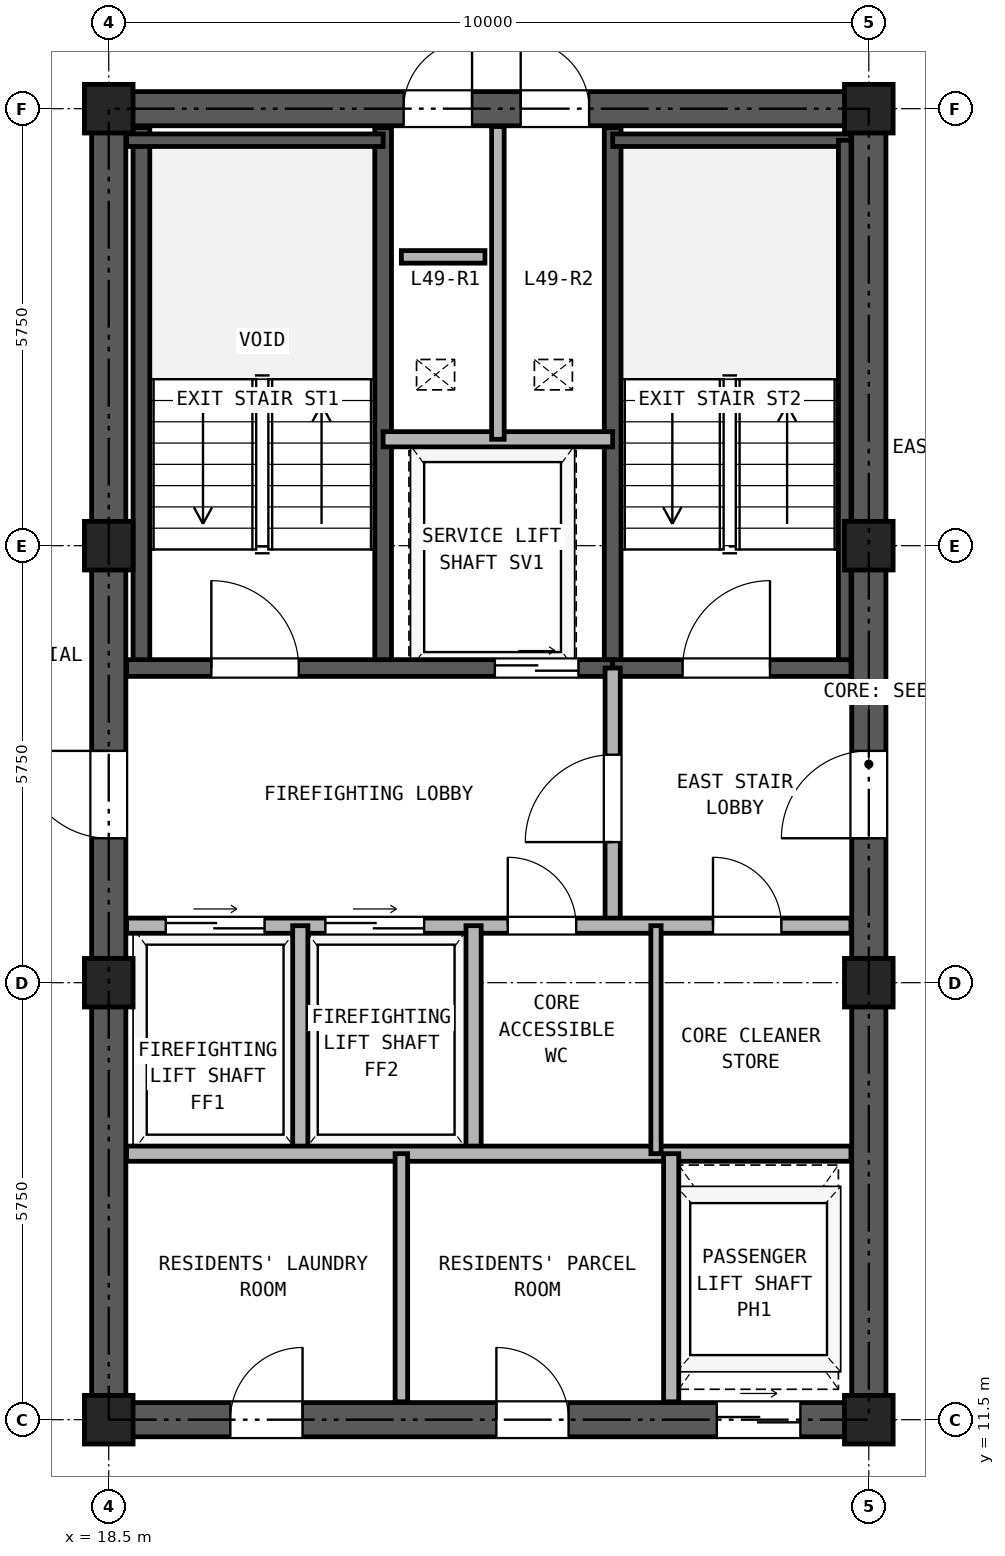
"""IFC4 building model, lengths in metres.
Left out: names, types, materials, properties, quantities, classifications, styles, units other than length and angle.
Written with IfcOpenShell. Run it as: python <this file> out.ifc"""

import sys

from ifc_helpers import new_model, si_unit, direction, frame, frame_2d, origin, origin_2d, place, context, subcontext, project, spatial, rectangle, hollow_rectangle, extrude, source, transform, mapped, element, fill, save


model = new_model("IFC4")
c1 = context("Model", 3, precision=1e-05, world=origin(), true_north=direction((0.0, 1.0)))
c2 = subcontext(c1, "Body", "Model", "MODEL_VIEW")
j1 = project(units=[si_unit("LENGTHUNIT", "METRE"), si_unit("PLANEANGLEUNIT", "RADIAN")], contexts=[c1])
p1 = place(None, origin())
s1 = spatial("IfcSite", under=j1, at=p1, CompositionType="ELEMENT")
p2 = place(p1, origin())
s2 = spatial("IfcBuilding", under=s1, at=p2, CompositionType="ELEMENT")
p3 = place(p2, frame((0.0, 0.0, 175.3)))
s3 = spatial("IfcBuildingStorey", under=s2, at=p3, CompositionType="ELEMENT", Elevation=175.3)
m1 = source(origin(), c2, "Body", "SweptSolid", [
    extrude(hollow_rectangle(XDim=0.64, YDim=0.64, WallThickness=0.035, at=origin_2d()), origin(), (0.0, 0.0, 1.0), 2.95),
])
for number, where, z_axis, x_axis in (
    (1, (18.5, 11.5, 0.0), (0.0, 0.0, 1.0), (1.0, 0.0, 0.0)),
    (2, (18.5, 17.25, 0.0), (0.0, 0.0, 1.0), (1.0, 0.0, 0.0)),
    (3, (18.5, 23.0, 0.0), (0.0, 0.0, 1.0), (1.0, 0.0, 0.0)),
    (4, (18.5, 28.75, 0.0), (0.0, 0.0, 1.0), (1.0, 0.0, 0.0)),
    (5, (28.5, 11.5, 0.0), (0.0, 0.0, 1.0), (1.0, 0.0, 0.0)),
    (6, (28.5, 17.25, 0.0), (0.0, 0.0, 1.0), (1.0, 0.0, 0.0)),
    (7, (28.5, 23.0, 0.0), (0.0, 0.0, 1.0), (1.0, 0.0, 0.0)),
    (8, (28.5, 28.75, 0.0), (0.0, 0.0, 1.0), (1.0, 0.0, 0.0)),
):
    element("IfcColumn", number, at=place(p3, frame(where, z_axis=z_axis, x_axis=x_axis)), inside=s3, PredefinedType="COLUMN", context=c2, shape_type="MappedRepresentation", body=[
        mapped(m1, transform((0.0, 0.0, 0.0), x_axis=(1.0, 0.0, 0.0), y_axis=(0.0, 1.0, 0.0), z_axis=(0.0, 0.0, 1.0), scale=1.0)),
    ])
p4 = place(p3, frame((18.275, 11.5, 0.0), z_axis=(0.0, 0.0, 1.0), x_axis=(1.0, 0.0, 0.0)))
e9 = element("IfcWall", 9, at=p4, inside=s3, PredefinedType="SHEAR", context=c2, shape_type="SweptSolid", body=[
    extrude(rectangle(XDim=10.45, YDim=0.45, at=frame_2d((5.225, 0.0))), origin(), (0.0, 0.0, 1.0), 2.95),
])
p5 = place(p4, frame((1.825, 0.0, 0.0)))
e10 = element("IfcOpeningElement", 10, at=p5, cuts=e9, PredefinedType="OPENING", context=c2, shape_type="SweptSolid", body=[
    extrude(rectangle(XDim=0.95, YDim=2.15, at=frame_2d((0.475, 1.075))), frame((0.0, 0.235, 0.0), z_axis=(0.0, -1.0, 0.0), x_axis=(1.0, 0.0, 0.0)), (0.0, 0.0, 1.0), 0.47),
])
p6 = place(p4, frame((5.325, 0.0, 0.0)))
e11 = element("IfcOpeningElement", 11, at=p6, cuts=e9, PredefinedType="OPENING", context=c2, shape_type="SweptSolid", body=[
    extrude(rectangle(XDim=0.95, YDim=2.15, at=frame_2d((0.475, 1.075))), frame((0.0, 0.235, 0.0), z_axis=(0.0, -1.0, 0.0), x_axis=(1.0, 0.0, 0.0)), (0.0, 0.0, 1.0), 0.47),
])
p7 = place(p4, frame((8.225, 0.0, 0.0)))
e12 = element("IfcOpeningElement", 12, at=p7, cuts=e9, PredefinedType="OPENING", context=c2, shape_type="SweptSolid", body=[
    extrude(rectangle(XDim=1.1, YDim=2.25, at=frame_2d((0.55, 1.125))), frame((0.0, 0.235, 0.0), z_axis=(0.0, -1.0, 0.0), x_axis=(1.0, 0.0, 0.0)), (0.0, 0.0, 1.0), 0.47),
])
p8 = place(p3, frame((18.275, 28.75, 0.0), z_axis=(0.0, 0.0, 1.0), x_axis=(1.0, 0.0, 0.0)))
e13 = element("IfcWall", 13, at=p8, inside=s3, PredefinedType="SHEAR", context=c2, shape_type="SweptSolid", body=[
    extrude(rectangle(XDim=10.45, YDim=0.45, at=frame_2d((5.225, 0.0))), origin(), (0.0, 0.0, 1.0), 2.95),
])
p9 = place(p8, frame((4.105, 0.0, 0.0)))
e14 = element("IfcOpeningElement", 14, at=p9, cuts=e13, PredefinedType="OPENING", context=c2, shape_type="SweptSolid", body=[
    extrude(rectangle(XDim=0.9, YDim=2.05, at=frame_2d((0.45, 1.025))), frame((0.0, 0.235, 0.0), z_axis=(0.0, -1.0, 0.0), x_axis=(1.0, 0.0, 0.0)), (0.0, 0.0, 1.0), 0.47),
])
p10 = place(p8, frame((5.645, 0.0, 0.0)))
e15 = element("IfcOpeningElement", 15, at=p10, cuts=e13, PredefinedType="OPENING", context=c2, shape_type="SweptSolid", body=[
    extrude(rectangle(XDim=0.9, YDim=2.05, at=frame_2d((0.45, 1.025))), frame((0.0, 0.235, 0.0), z_axis=(0.0, -1.0, 0.0), x_axis=(1.0, 0.0, 0.0)), (0.0, 0.0, 1.0), 0.47),
])
p11 = place(p3, frame((18.5, 11.725, 0.0), z_axis=(0.0, 0.0, 1.0), x_axis=(0.0, 1.0, 0.0)))
e16 = element("IfcWall", 16, at=p11, inside=s3, PredefinedType="SHEAR", context=c2, shape_type="SweptSolid", body=[
    extrude(rectangle(XDim=16.8, YDim=0.45, at=frame_2d((8.4, 0.0))), origin(), (0.0, 0.0, 1.0), 2.95),
])
p12 = place(p11, frame((7.425, 0.0, 0.0)))
e17 = element("IfcOpeningElement", 17, at=p12, cuts=e16, PredefinedType="OPENING", context=c2, shape_type="SweptSolid", body=[
    extrude(rectangle(XDim=1.15, YDim=2.2, at=frame_2d((0.575, 1.1))), frame((0.0, 0.235, 0.0), z_axis=(0.0, -1.0, 0.0), x_axis=(1.0, 0.0, 0.0)), (0.0, 0.0, 1.0), 0.47),
])
p13 = place(p3, frame((28.5, 11.725, 0.0), z_axis=(0.0, 0.0, 1.0), x_axis=(0.0, 1.0, 0.0)))
e18 = element("IfcWall", 18, at=p13, inside=s3, PredefinedType="SHEAR", context=c2, shape_type="SweptSolid", body=[
    extrude(rectangle(XDim=16.8, YDim=0.45, at=frame_2d((8.4, 0.0))), origin(), (0.0, 0.0, 1.0), 2.95),
])
p14 = place(p13, frame((7.425, 0.0, 0.0)))
e19 = element("IfcOpeningElement", 19, at=p14, cuts=e18, PredefinedType="OPENING", context=c2, shape_type="SweptSolid", body=[
    extrude(rectangle(XDim=1.15, YDim=2.2, at=frame_2d((0.575, 1.1))), frame((0.0, 0.235, 0.0), z_axis=(0.0, -1.0, 0.0), x_axis=(1.0, 0.0, 0.0)), (0.0, 0.0, 1.0), 0.47),
])
for number, where, z_axis, x_axis in (
    (20, (18.93, 21.39, 0.0), (0.0, 0.0, 1.0), (0.0, 1.0, 0.0)),
    (21, (22.11, 21.39, 0.0), (0.0, 0.0, 1.0), (0.0, 1.0, 0.0)),
    (22, (25.13, 21.39, 0.0), (0.0, 0.0, 1.0), (0.0, 1.0, 0.0)),
):
    element("IfcWall", number, at=place(p3, frame(where, z_axis=z_axis, x_axis=x_axis)), inside=s3, PredefinedType="SOLIDWALL", context=c2, shape_type="SweptSolid", body=[
        extrude(rectangle(XDim=7.11, YDim=0.22, at=frame_2d((3.555, 0.0))), origin(), (0.0, 0.0, 1.0), 2.95),
    ])
p15 = place(p3, frame((18.735, 28.335, 0.0), z_axis=(0.0, 0.0, 1.0), x_axis=(1.0, 0.0, 0.0)))
e23 = element("IfcWall", 23, at=p15, inside=s3, PredefinedType="PARTITIONING", context=c2, shape_type="SweptSolid", body=[
    extrude(rectangle(XDim=3.375, YDim=0.165, at=frame_2d((1.688, 0.0))), origin(), (0.0, 0.0, 1.0), 2.95),
])
p16 = place(p3, frame((25.13, 28.335, 0.0), z_axis=(0.0, 0.0, 1.0), x_axis=(1.0, 0.0, 0.0)))
e24 = element("IfcWall", 24, at=p16, inside=s3, PredefinedType="PARTITIONING", context=c2, shape_type="SweptSolid", body=[
    extrude(rectangle(XDim=3.135, YDim=0.165, at=frame_2d((1.567, 0.0))), origin(), (0.0, 0.0, 1.0), 2.95),
])
p17 = place(p3, frame((28.183, 21.39, 0.0), z_axis=(0.0, 0.0, 1.0), x_axis=(0.0, 1.0, 0.0)))
e25 = element("IfcWall", 25, at=p17, inside=s3, PredefinedType="PARTITIONING", context=c2, shape_type="SweptSolid", body=[
    extrude(rectangle(XDim=6.945, YDim=0.165, at=frame_2d((3.473, 0.0))), origin(), (0.0, 0.0, 1.0), 2.95),
])
p18 = place(p3, frame((18.735, 21.39, 0.0), z_axis=(0.0, 0.0, 1.0), x_axis=(1.0, 0.0, 0.0)))
e26 = element("IfcWall", 26, at=p18, inside=s3, PredefinedType="SOLIDWALL", context=c2, shape_type="SweptSolid", body=[
    extrude(rectangle(XDim=6.395, YDim=0.22, at=frame_2d((3.197, 0.0))), origin(), (0.0, 0.0, 1.0), 2.95),
])
p19 = place(p18, frame((1.115, 0.0, 0.0)))
e27 = element("IfcOpeningElement", 27, at=p19, cuts=e26, PredefinedType="OPENING", context=c2, shape_type="SweptSolid", body=[
    extrude(rectangle(XDim=1.15, YDim=2.2, at=frame_2d((0.575, 1.1))), frame((0.0, 0.12, 0.0), z_axis=(0.0, -1.0, 0.0), x_axis=(1.0, 0.0, 0.0)), (0.0, 0.0, 1.0), 0.24),
])
p20 = place(p18, frame((4.845, 0.0, 0.0)))
e28 = element("IfcOpeningElement", 28, at=p20, cuts=e26, PredefinedType="OPENING", context=c2, shape_type="SweptSolid", body=[
    extrude(rectangle(XDim=1.1, YDim=2.25, at=frame_2d((0.55, 1.125))), frame((0.0, 0.12, 0.0), z_axis=(0.0, -1.0, 0.0), x_axis=(1.0, 0.0, 0.0)), (0.0, 0.0, 1.0), 0.24),
])
p21 = place(p3, frame((25.13, 21.39, 0.0), z_axis=(0.0, 0.0, 1.0), x_axis=(1.0, 0.0, 0.0)))
e29 = element("IfcWall", 29, at=p21, inside=s3, PredefinedType="SOLIDWALL", context=c2, shape_type="SweptSolid", body=[
    extrude(rectangle(XDim=3.135, YDim=0.22, at=frame_2d((1.567, 0.0))), origin(), (0.0, 0.0, 1.0), 2.95),
])
p22 = place(p21, frame((0.92, 0.0, 0.0)))
e30 = element("IfcOpeningElement", 30, at=p22, cuts=e29, PredefinedType="OPENING", context=c2, shape_type="SweptSolid", body=[
    extrude(rectangle(XDim=1.15, YDim=2.2, at=frame_2d((0.575, 1.1))), frame((0.0, 0.12, 0.0), z_axis=(0.0, -1.0, 0.0), x_axis=(1.0, 0.0, 0.0)), (0.0, 0.0, 1.0), 0.24),
])
p23 = place(p3, frame((22.11, 24.4, 0.0), z_axis=(0.0, 0.0, 1.0), x_axis=(1.0, 0.0, 0.0)))
e31 = element("IfcWall", 31, at=p23, inside=s3, PredefinedType="PARTITIONING", context=c2, shape_type="SweptSolid", body=[
    extrude(rectangle(XDim=3.02, YDim=0.2, at=frame_2d((1.51, 0.0))), origin(), (0.0, 0.0, 1.0), 2.95),
])
p24 = place(p3, frame((23.62, 24.4, 0.0), z_axis=(0.0, 0.0, 1.0), x_axis=(0.0, 1.0, 0.0)))
e32 = element("IfcWall", 32, at=p24, inside=s3, PredefinedType="PARTITIONING", context=c2, shape_type="SweptSolid", body=[
    extrude(rectangle(XDim=4.115, YDim=0.165, at=frame_2d((2.058, 0.0))), origin(), (0.0, 0.0, 1.0), 2.95),
])
p25 = place(p3, frame((25.13, 18.0, 0.0), z_axis=(0.0, 0.0, 1.0), x_axis=(0.0, 1.0, 0.0)))
e33 = element("IfcWall", 33, at=p25, inside=s3, PredefinedType="PARTITIONING", context=c2, shape_type="SweptSolid", body=[
    extrude(rectangle(XDim=3.39, YDim=0.2, at=frame_2d((1.695, 0.0))), origin(), (0.0, 0.0, 1.0), 2.95),
])
p26 = place(p25, frame((1.1, 0.0, 0.0)))
e34 = element("IfcOpeningElement", 34, at=p26, cuts=e33, PredefinedType="OPENING", context=c2, shape_type="SweptSolid", body=[
    extrude(rectangle(XDim=1.15, YDim=2.2, at=frame_2d((0.575, 1.1))), frame((0.0, 0.11, 0.0), z_axis=(0.0, -1.0, 0.0), x_axis=(1.0, 0.0, 0.0)), (0.0, 0.0, 1.0), 0.22),
])
p27 = place(p3, frame((18.735, 18.0, 0.0), z_axis=(0.0, 0.0, 1.0), x_axis=(1.0, 0.0, 0.0)))
e35 = element("IfcWall", 35, at=p27, inside=s3, PredefinedType="PARTITIONING", context=c2, shape_type="SweptSolid", body=[
    extrude(rectangle(XDim=9.53, YDim=0.2, at=frame_2d((4.765, 0.0))), origin(), (0.0, 0.0, 1.0), 2.95),
])
p28 = place(p27, frame((0.515, 0.0, 0.0)))
e36 = element("IfcOpeningElement", 36, at=p28, cuts=e35, PredefinedType="OPENING", context=c2, shape_type="SweptSolid", body=[
    extrude(rectangle(XDim=1.3, YDim=2.3, at=frame_2d((0.65, 1.15))), frame((0.0, 0.11, 0.0), z_axis=(0.0, -1.0, 0.0), x_axis=(1.0, 0.0, 0.0)), (0.0, 0.0, 1.0), 0.22),
])
p29 = place(p27, frame((2.615, 0.0, 0.0)))
e37 = element("IfcOpeningElement", 37, at=p29, cuts=e35, PredefinedType="OPENING", context=c2, shape_type="SweptSolid", body=[
    extrude(rectangle(XDim=1.3, YDim=2.3, at=frame_2d((0.65, 1.15))), frame((0.0, 0.11, 0.0), z_axis=(0.0, -1.0, 0.0), x_axis=(1.0, 0.0, 0.0)), (0.0, 0.0, 1.0), 0.22),
])
p30 = place(p27, frame((5.015, 0.0, 0.0)))
e38 = element("IfcOpeningElement", 38, at=p30, cuts=e35, PredefinedType="OPENING", context=c2, shape_type="SweptSolid", body=[
    extrude(rectangle(XDim=0.9, YDim=2.05, at=frame_2d((0.45, 1.025))), frame((0.0, 0.11, 0.0), z_axis=(0.0, -1.0, 0.0), x_axis=(1.0, 0.0, 0.0)), (0.0, 0.0, 1.0), 0.22),
])
p31 = place(p27, frame((7.715, 0.0, 0.0)))
e39 = element("IfcOpeningElement", 39, at=p31, cuts=e35, PredefinedType="OPENING", context=c2, shape_type="SweptSolid", body=[
    extrude(rectangle(XDim=0.9, YDim=2.05, at=frame_2d((0.45, 1.025))), frame((0.0, 0.11, 0.0), z_axis=(0.0, -1.0, 0.0), x_axis=(1.0, 0.0, 0.0)), (0.0, 0.0, 1.0), 0.22),
])
for number, where, z_axis, x_axis in (
    (40, (21.02, 15.0, 0.0), (0.0, 0.0, 1.0), (0.0, 1.0, 0.0)),
    (41, (23.3, 15.0, 0.0), (0.0, 0.0, 1.0), (0.0, 1.0, 0.0)),
):
    element("IfcWall", number, at=place(p3, frame(where, z_axis=z_axis, x_axis=x_axis)), inside=s3, PredefinedType="PARTITIONING", context=c2, shape_type="SweptSolid", body=[
        extrude(rectangle(XDim=3.0, YDim=0.2, at=frame_2d((1.5, 0.0))), origin(), (0.0, 0.0, 1.0), 2.95),
    ])
p32 = place(p3, frame((18.735, 15.0, 0.0), z_axis=(0.0, 0.0, 1.0), x_axis=(1.0, 0.0, 0.0)))
e42 = element("IfcWall", 42, at=p32, inside=s3, PredefinedType="PARTITIONING", context=c2, shape_type="SweptSolid", body=[
    extrude(rectangle(XDim=9.53, YDim=0.2, at=frame_2d((4.765, 0.0))), origin(), (0.0, 0.0, 1.0), 2.95),
])
p33 = place(p3, frame((25.7, 15.0, 0.0), z_axis=(0.0, 0.0, 1.0), x_axis=(0.0, 1.0, 0.0)))
e43 = element("IfcWall", 43, at=p33, inside=s3, PredefinedType="PARTITIONING", context=c2, shape_type="SweptSolid", body=[
    extrude(rectangle(XDim=3.0, YDim=0.135, at=frame_2d((1.5, 0.0))), origin(), (0.0, 0.0, 1.0), 2.95),
])
p34 = place(p3, frame((22.35, 11.735, 0.0), z_axis=(0.0, 0.0, 1.0), x_axis=(0.0, 1.0, 0.0)))
e44 = element("IfcWall", 44, at=p34, inside=s3, PredefinedType="PARTITIONING", context=c2, shape_type="SweptSolid", body=[
    extrude(rectangle(XDim=3.265, YDim=0.165, at=frame_2d((1.632, 0.0))), origin(), (0.0, 0.0, 1.0), 2.95),
])
p35 = place(p3, frame((25.9, 11.735, 0.0), z_axis=(0.0, 0.0, 1.0), x_axis=(0.0, 1.0, 0.0)))
e45 = element("IfcWall", 45, at=p35, inside=s3, PredefinedType="PARTITIONING", context=c2, shape_type="SweptSolid", body=[
    extrude(rectangle(XDim=3.265, YDim=0.2, at=frame_2d((1.632, 0.0))), origin(), (0.0, 0.0, 1.0), 2.95),
])
p36 = place(p3, frame((22.35, 26.8, 0.0), z_axis=(0.0, 0.0, 1.0), x_axis=(1.0, 0.0, 0.0)))
e46 = element("IfcWall", 46, at=p36, inside=s3, PredefinedType="PARTITIONING", context=c2, shape_type="SweptSolid", body=[
    extrude(rectangle(XDim=1.1, YDim=0.165, at=frame_2d((0.55, 0.0))), origin(), (0.0, 0.0, 1.0), 2.95),
])
p37 = place(p19, frame((1.15, 0.0, 0.0), z_axis=(0.0, 0.0, 1.0), x_axis=(-1.0, 0.0, 0.0)))
e47 = element("IfcDoor", 47, at=p37, inside=s3, OperationType="SINGLE_SWING_LEFT", PredefinedType="DOOR", context=c2, shape_type="SweptSolid", body=[
    extrude(rectangle(XDim=1.15, YDim=2.2, at=frame_2d((0.575, 1.1))), frame((0.0, 0.025, 0.0), z_axis=(0.0, -1.0, 0.0), x_axis=(1.0, 0.0, 0.0)), (0.0, 0.0, 1.0), 0.05),
])
fill(e27, e47)
p38 = place(p22, frame((1.15, 0.0, 0.0), z_axis=(0.0, 0.0, 1.0), x_axis=(-1.0, 0.0, 0.0)))
e48 = element("IfcDoor", 48, at=p38, inside=s3, OperationType="SINGLE_SWING_RIGHT", PredefinedType="DOOR", context=c2, shape_type="SweptSolid", body=[
    extrude(rectangle(XDim=1.15, YDim=2.2, at=frame_2d((0.575, 1.1))), frame((0.0, 0.025, 0.0), z_axis=(0.0, -1.0, 0.0), x_axis=(1.0, 0.0, 0.0)), (0.0, 0.0, 1.0), 0.05),
])
fill(e30, e48)
p39 = place(p20, frame((1.1, 0.0, 0.0), z_axis=(0.0, 0.0, 1.0), x_axis=(-1.0, 0.0, 0.0)))
e49 = element("IfcDoor", 49, at=p39, inside=s3, OperationType="DOUBLE_DOOR_SLIDING", PredefinedType="DOOR", context=c2, shape_type="SweptSolid", body=[
    extrude(rectangle(XDim=1.1, YDim=2.25, at=frame_2d((0.55, 1.125))), frame((0.0, 0.025, 0.0), z_axis=(0.0, -1.0, 0.0), x_axis=(1.0, 0.0, 0.0)), (0.0, 0.0, 1.0), 0.05),
])
fill(e28, e49)
p40 = place(p26, origin())
e50 = element("IfcDoor", 50, at=p40, inside=s3, OperationType="SINGLE_SWING_LEFT", PredefinedType="DOOR", context=c2, shape_type="SweptSolid", body=[
    extrude(rectangle(XDim=1.15, YDim=2.2, at=frame_2d((0.575, 1.1))), frame((0.0, 0.025, 0.0), z_axis=(0.0, -1.0, 0.0), x_axis=(1.0, 0.0, 0.0)), (0.0, 0.0, 1.0), 0.05),
])
fill(e34, e50)
p41 = place(p28, origin())
e51 = element("IfcDoor", 51, at=p41, inside=s3, OperationType="DOUBLE_DOOR_SLIDING", PredefinedType="DOOR", context=c2, shape_type="SweptSolid", body=[
    extrude(rectangle(XDim=1.3, YDim=2.3, at=frame_2d((0.65, 1.15))), frame((0.0, 0.025, 0.0), z_axis=(0.0, -1.0, 0.0), x_axis=(1.0, 0.0, 0.0)), (0.0, 0.0, 1.0), 0.05),
])
fill(e36, e51)
p42 = place(p29, origin())
e52 = element("IfcDoor", 52, at=p42, inside=s3, OperationType="DOUBLE_DOOR_SLIDING", PredefinedType="DOOR", context=c2, shape_type="SweptSolid", body=[
    extrude(rectangle(XDim=1.3, YDim=2.3, at=frame_2d((0.65, 1.15))), frame((0.0, 0.025, 0.0), z_axis=(0.0, -1.0, 0.0), x_axis=(1.0, 0.0, 0.0)), (0.0, 0.0, 1.0), 0.05),
])
fill(e37, e52)
p43 = place(p30, frame((0.9, 0.0, 0.0), z_axis=(0.0, 0.0, 1.0), x_axis=(-1.0, 0.0, 0.0)))
e53 = element("IfcDoor", 53, at=p43, inside=s3, OperationType="SINGLE_SWING_LEFT", PredefinedType="DOOR", context=c2, shape_type="SweptSolid", body=[
    extrude(rectangle(XDim=0.9, YDim=2.05, at=frame_2d((0.45, 1.025))), frame((0.0, 0.025, 0.0), z_axis=(0.0, -1.0, 0.0), x_axis=(1.0, 0.0, 0.0)), (0.0, 0.0, 1.0), 0.05),
])
fill(e38, e53)
p44 = place(p31, frame((0.9, 0.0, 0.0), z_axis=(0.0, 0.0, 1.0), x_axis=(-1.0, 0.0, 0.0)))
e54 = element("IfcDoor", 54, at=p44, inside=s3, OperationType="SINGLE_SWING_LEFT", PredefinedType="DOOR", context=c2, shape_type="SweptSolid", body=[
    extrude(rectangle(XDim=0.9, YDim=2.05, at=frame_2d((0.45, 1.025))), frame((0.0, 0.025, 0.0), z_axis=(0.0, -1.0, 0.0), x_axis=(1.0, 0.0, 0.0)), (0.0, 0.0, 1.0), 0.05),
])
fill(e39, e54)
p45 = place(p12, frame((1.15, 0.0, 0.0), z_axis=(0.0, 0.0, 1.0), x_axis=(-1.0, 0.0, 0.0)))
e55 = element("IfcDoor", 55, at=p45, inside=s3, OperationType="SINGLE_SWING_RIGHT", PredefinedType="DOOR", context=c2, shape_type="SweptSolid", body=[
    extrude(rectangle(XDim=1.15, YDim=2.2, at=frame_2d((0.575, 1.1))), frame((0.0, 0.025, 0.0), z_axis=(0.0, -1.0, 0.0), x_axis=(1.0, 0.0, 0.0)), (0.0, 0.0, 1.0), 0.05),
])
fill(e17, e55)
p46 = place(p14, origin())
e56 = element("IfcDoor", 56, at=p46, inside=s3, OperationType="SINGLE_SWING_LEFT", PredefinedType="DOOR", context=c2, shape_type="SweptSolid", body=[
    extrude(rectangle(XDim=1.15, YDim=2.2, at=frame_2d((0.575, 1.1))), frame((0.0, 0.025, 0.0), z_axis=(0.0, -1.0, 0.0), x_axis=(1.0, 0.0, 0.0)), (0.0, 0.0, 1.0), 0.05),
])
fill(e19, e56)
p47 = place(p9, origin())
e57 = element("IfcDoor", 57, at=p47, inside=s3, OperationType="SINGLE_SWING_RIGHT", PredefinedType="DOOR", context=c2, shape_type="SweptSolid", body=[
    extrude(rectangle(XDim=0.9, YDim=2.05, at=frame_2d((0.45, 1.025))), frame((0.0, 0.025, 0.0), z_axis=(0.0, -1.0, 0.0), x_axis=(1.0, 0.0, 0.0)), (0.0, 0.0, 1.0), 0.05),
])
fill(e14, e57)
p48 = place(p10, origin())
e58 = element("IfcDoor", 58, at=p48, inside=s3, OperationType="SINGLE_SWING_LEFT", PredefinedType="DOOR", context=c2, shape_type="SweptSolid", body=[
    extrude(rectangle(XDim=0.9, YDim=2.05, at=frame_2d((0.45, 1.025))), frame((0.0, 0.025, 0.0), z_axis=(0.0, -1.0, 0.0), x_axis=(1.0, 0.0, 0.0)), (0.0, 0.0, 1.0), 0.05),
])
fill(e15, e58)
p49 = place(p5, frame((0.95, 0.0, 0.0), z_axis=(0.0, 0.0, 1.0), x_axis=(-1.0, 0.0, 0.0)))
e59 = element("IfcDoor", 59, at=p49, inside=s3, OperationType="SINGLE_SWING_RIGHT", PredefinedType="DOOR", context=c2, shape_type="SweptSolid", body=[
    extrude(rectangle(XDim=0.95, YDim=2.15, at=frame_2d((0.475, 1.075))), frame((0.0, 0.025, 0.0), z_axis=(0.0, -1.0, 0.0), x_axis=(1.0, 0.0, 0.0)), (0.0, 0.0, 1.0), 0.05),
])
fill(e10, e59)
p50 = place(p6, frame((0.95, 0.0, 0.0), z_axis=(0.0, 0.0, 1.0), x_axis=(-1.0, 0.0, 0.0)))
e60 = element("IfcDoor", 60, at=p50, inside=s3, OperationType="SINGLE_SWING_LEFT", PredefinedType="DOOR", context=c2, shape_type="SweptSolid", body=[
    extrude(rectangle(XDim=0.95, YDim=2.15, at=frame_2d((0.475, 1.075))), frame((0.0, 0.025, 0.0), z_axis=(0.0, -1.0, 0.0), x_axis=(1.0, 0.0, 0.0)), (0.0, 0.0, 1.0), 0.05),
])
fill(e11, e60)
p51 = place(p7, frame((1.1, 0.0, 0.0), z_axis=(0.0, 0.0, 1.0), x_axis=(-1.0, 0.0, 0.0)))
e61 = element("IfcDoor", 61, at=p51, inside=s3, OperationType="DOUBLE_DOOR_SLIDING", PredefinedType="DOOR", context=c2, shape_type="SweptSolid", body=[
    extrude(rectangle(XDim=1.1, YDim=2.25, at=frame_2d((0.55, 1.125))), frame((0.0, 0.025, 0.0), z_axis=(0.0, -1.0, 0.0), x_axis=(1.0, 0.0, 0.0)), (0.0, 0.0, 1.0), 0.05),
])
fill(e12, e61)
save(model, sys.argv[1])
